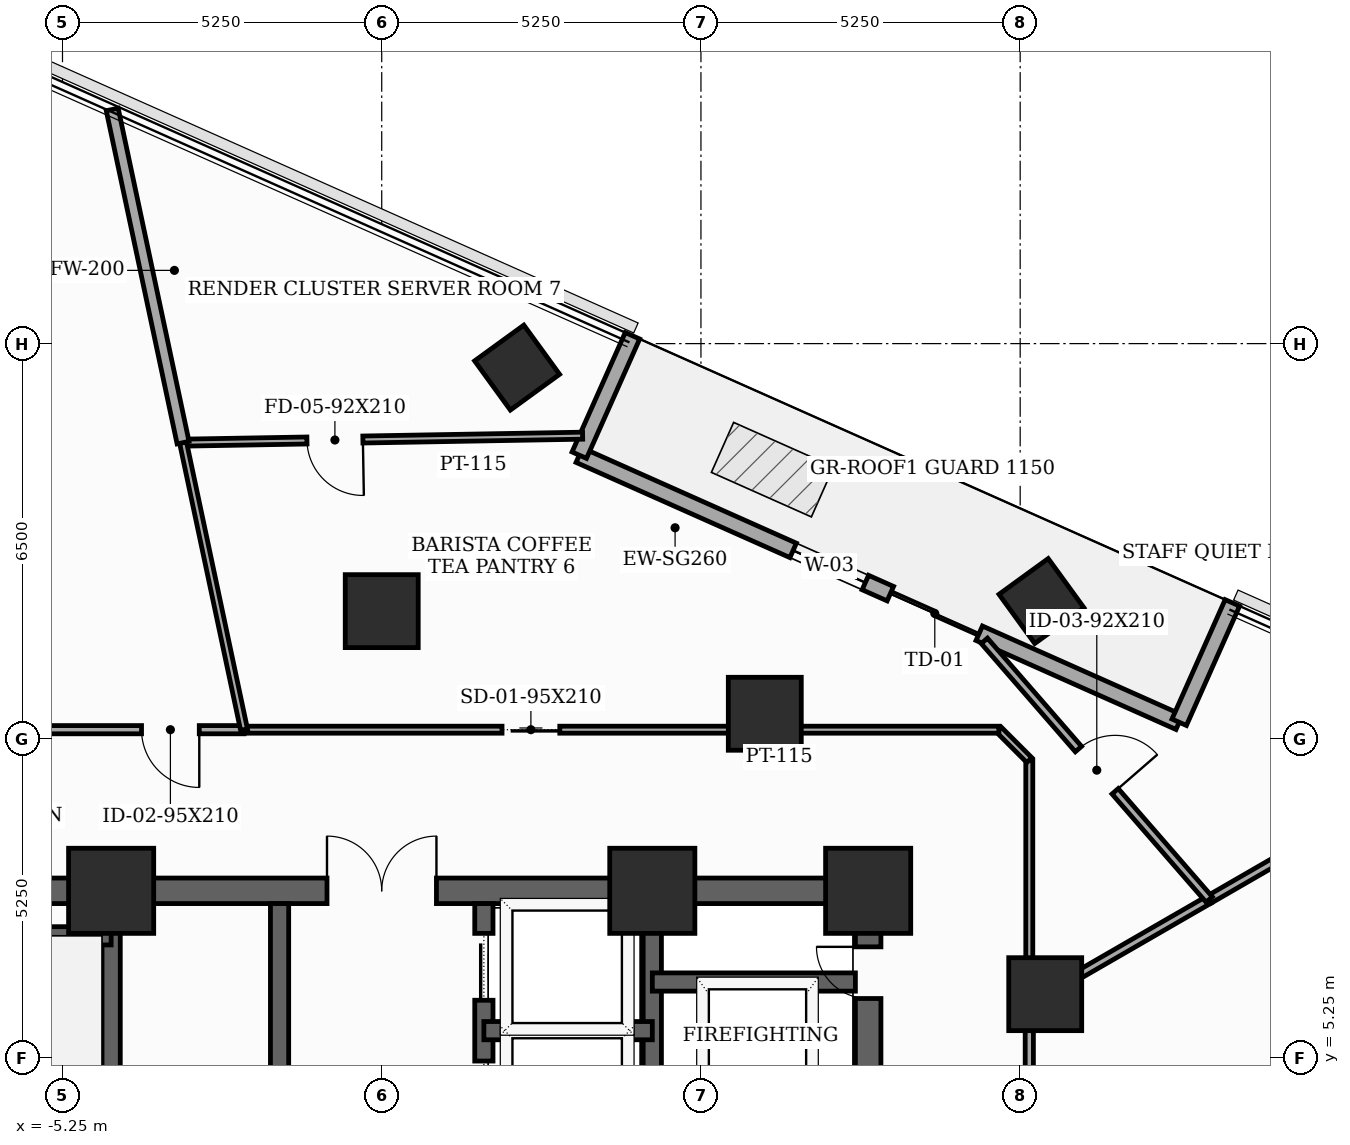
"""IFC4 building model, lengths in metres.
Left out: names, types, materials, properties, quantities, classifications, styles, units other than length and angle.
Written with IfcOpenShell. Run it as: python <this file> out.ifc"""

import sys

from ifc_helpers import new_model, si_unit, direction, frame, frame_2d, origin, origin_2d, place, context, subcontext, project, spatial, rectangle, extrude, element, fill, save


model = new_model("IFC4")
c1 = context("Model", 3, precision=1e-05, world=origin(), true_north=direction((0.0, 1.0)))
c2 = subcontext(c1, "Body", "Model", "MODEL_VIEW")
j1 = project(units=[si_unit("LENGTHUNIT", "METRE"), si_unit("PLANEANGLEUNIT", "RADIAN")], contexts=[c1])
p1 = place(None, origin())
s1 = spatial("IfcSite", under=j1, at=p1, CompositionType="ELEMENT")
p2 = place(p1, origin())
s2 = spatial("IfcBuilding", under=s1, at=p2, CompositionType="ELEMENT")
p3 = place(p2, frame((0.0, 0.0, 176.8)))
s3 = spatial("IfcBuildingStorey", under=s2, at=p3, CompositionType="ELEMENT", Elevation=176.8)
for number, where, z_axis, x_axis in (
    (1, (8.0, 8.0, 0.0), (0.0, 0.0, 1.0), (1.0, 0.0, 0.0)),
    (2, (4.45, 8.0, 0.0), (0.0, 0.0, 1.0), (1.0, 0.0, 0.0)),
    (3, (-4.45, 8.0, 0.0), (0.0, 0.0, 1.0), (1.0, 0.0, 0.0)),
):
    element("IfcColumn", number, at=place(p3, frame(where, z_axis=z_axis, x_axis=x_axis)), inside=s3, PredefinedType="COLUMN", context=c2, shape_type="SweptSolid", body=[
        extrude(rectangle(XDim=1.4, YDim=1.4, at=origin_2d()), origin(), (0.0, 0.0, 1.0), 3.7),
    ])
for number, where, z_axis, x_axis in (
    (4, (10.912, 6.3, 0.0), (0.0, 0.0, 1.0), (1.0, 0.0, 0.0)),
    (5, (6.3, 10.912, 0.0), (0.0, 0.0, 1.0), (1.0, 0.0, 0.0)),
    (6, (0.0, 12.6, 0.0), (0.0, 0.0, 1.0), (1.0, 0.0, 0.0)),
):
    element("IfcColumn", number, at=place(p3, frame(where, z_axis=z_axis, x_axis=x_axis)), inside=s3, PredefinedType="COLUMN", context=c2, shape_type="SweptSolid", body=[
        extrude(rectangle(XDim=1.2, YDim=1.2, at=origin_2d()), origin(), (0.0, 0.0, 1.0), 3.7),
    ])
for number, where, z_axis, x_axis in (
    (7, (10.85, 12.766, 0.0), (0.0, 0.0, 1.0), (0.809, 0.588, 0.0)),
    (8, (2.227, 16.605, 0.0), (0.0, 0.0, 1.0), (0.809, 0.588, 0.0)),
):
    element("IfcColumn", number, at=place(p3, frame(where, z_axis=z_axis, x_axis=x_axis)), inside=s3, PredefinedType="COLUMN", context=c2, shape_type="SweptSolid", body=[
        extrude(rectangle(XDim=1.0, YDim=1.0, at=origin_2d()), origin(), (0.0, 0.0, 1.0), 3.7),
    ])
p4 = place(p3, frame((13.115, 10.772, 0.0), z_axis=(0.0, 0.0, 1.0), x_axis=(-0.913545683247, 0.406736136359, 0.0)))
e9 = element("IfcWall", 9, at=p4, inside=s3, PredefinedType="SOLIDWALL", context=c2, shape_type="SweptSolid", body=[
    extrude(rectangle(XDim=10.8, YDim=0.26, at=frame_2d((5.4, 0.0))), origin(), (0.0, 0.0, 1.0), 3.5),
])
p5 = place(p4, frame((3.6, 0.0, 0.0)))
e10 = element("IfcOpeningElement", 10, at=p5, cuts=e9, PredefinedType="OPENING", context=c2, shape_type="SweptSolid", body=[
    extrude(rectangle(XDim=1.6, YDim=2.08, at=frame_2d((0.8, 1.04))), frame((0.0, 0.14, 0.0), z_axis=(0.0, -1.0, 0.0), x_axis=(1.0, 0.0, 0.0)), (0.0, 0.0, 1.0), 0.28),
])
p6 = place(p4, frame((5.65, 0.0, 0.85)))
e11 = element("IfcOpeningElement", 11, at=p6, cuts=e9, PredefinedType="OPENING", context=c2, shape_type="SweptSolid", body=[
    extrude(rectangle(XDim=1.3, YDim=1.25, at=frame_2d((0.65, 0.625))), frame((0.0, 0.14, 0.0), z_axis=(0.0, -1.0, 0.0), x_axis=(1.0, 0.0, 0.0)), (0.0, 0.0, 1.0), 0.28),
])
for number, where, z_axis, x_axis in (
    (12, (13.99, 12.736, 0.0), (0.0, 0.0, 1.0), (-0.407, -0.914, 0.0)),
    (13, (3.249, 15.165, 0.0), (0.0, 0.0, 1.0), (0.407, 0.914, 0.0)),
):
    element("IfcWall", number, at=place(p3, frame(where, z_axis=z_axis, x_axis=x_axis)), inside=s3, PredefinedType="SOLIDWALL", context=c2, shape_type="SweptSolid", body=[
        extrude(rectangle(XDim=2.15, YDim=0.26, at=frame_2d((1.075, 0.0))), origin(), (0.0, 0.0, 1.0), 3.5),
    ])
p7 = place(p3, frame((8.0, -8.0, 0.0), z_axis=(0.0, 0.0, 1.0), x_axis=(0.0, 1.0, 0.0)))
e14 = element("IfcWall", 14, at=p7, inside=s3, PredefinedType="SHEAR", context=c2, shape_type="SweptSolid", body=[
    extrude(rectangle(XDim=16.0, YDim=0.42, at=frame_2d((8.0, 0.0))), origin(), (0.0, 0.0, 1.0), 3.5),
])
p8 = place(p7, frame((9.6, 0.0, 0.0)))
e15 = element("IfcOpeningElement", 15, at=p8, cuts=e14, PredefinedType="OPENING", context=c2, shape_type="SweptSolid", body=[
    extrude(rectangle(XDim=1.05, YDim=2.15, at=frame_2d((0.525, 1.075))), frame((0.0, 0.22, 0.0), z_axis=(0.0, -1.0, 0.0), x_axis=(1.0, 0.0, 0.0)), (0.0, 0.0, 1.0), 0.44),
])
p9 = place(p7, frame((14.229, 0.0, 0.0)))
e16 = element("IfcOpeningElement", 16, at=p9, cuts=e14, PredefinedType="OPENING", context=c2, shape_type="SweptSolid", body=[
    extrude(rectangle(XDim=0.85, YDim=2.02, at=frame_2d((0.425, 1.01))), frame((0.0, 0.22, 0.0), z_axis=(0.0, -1.0, 0.0), x_axis=(1.0, 0.0, 0.0)), (0.0, 0.0, 1.0), 0.44),
])
p10 = place(p3, frame((-8.0, 8.0, 0.0), z_axis=(0.0, 0.0, 1.0), x_axis=(1.0, 0.0, 0.0)))
e17 = element("IfcWall", 17, at=p10, inside=s3, PredefinedType="SHEAR", context=c2, shape_type="SweptSolid", body=[
    extrude(rectangle(XDim=16.0, YDim=0.42, at=frame_2d((8.0, 0.0))), origin(), (0.0, 0.0, 1.0), 3.5),
])
p11 = place(p10, frame((7.1, 0.0, 0.0)))
e18 = element("IfcOpeningElement", 18, at=p11, cuts=e17, PredefinedType="OPENING", context=c2, shape_type="SweptSolid", body=[
    extrude(rectangle(XDim=1.8, YDim=2.15, at=frame_2d((0.9, 1.075))), frame((0.0, 0.22, 0.0), z_axis=(0.0, -1.0, 0.0), x_axis=(1.0, 0.0, 0.0)), (0.0, 0.0, 1.0), 0.44),
])
for number, where, z_axis, x_axis in (
    (19, (-4.45, -7.79, 0.0), (0.0, 0.0, 1.0), (0.0, 1.0, 0.0)),
    (20, (4.45, -7.79, 0.0), (0.0, 0.0, 1.0), (0.0, 1.0, 0.0)),
):
    element("IfcWall", number, at=place(p3, frame(where, z_axis=z_axis, x_axis=x_axis)), inside=s3, PredefinedType="SHEAR", context=c2, shape_type="SweptSolid", body=[
        extrude(rectangle(XDim=15.58, YDim=0.3, at=frame_2d((7.79, 0.0))), origin(), (0.0, 0.0, 1.0), 3.5),
    ])
for number, where, z_axis, x_axis in (
    (21, (-7.79, 7.26, 0.0), (0.0, 0.0, 1.0), (1.0, 0.0, 0.0)),
    (22, (4.45, 6.5, 0.0), (0.0, 0.0, 1.0), (1.0, 0.0, 0.0)),
):
    element("IfcWall", number, at=place(p3, frame(where, z_axis=z_axis, x_axis=x_axis)), inside=s3, PredefinedType="SHEAR", context=c2, shape_type="SweptSolid", body=[
        extrude(rectangle(XDim=3.34, YDim=0.3, at=frame_2d((1.67, 0.0))), origin(), (0.0, 0.0, 1.0), 3.5),
    ])
p12 = place(p3, frame((-1.68, -4.85, 0.0), z_axis=(0.0, 0.0, 1.0), x_axis=(0.0, 1.0, 0.0)))
e23 = element("IfcWall", 23, at=p12, inside=s3, PredefinedType="SHEAR", context=c2, shape_type="SweptSolid", body=[
    extrude(rectangle(XDim=12.64, YDim=0.3, at=frame_2d((6.32, 0.0))), origin(), (0.0, 0.0, 1.0), 3.5),
])
p13 = place(p12, frame((1.05, 0.0, 0.0)))
e24 = element("IfcOpeningElement", 24, at=p13, cuts=e23, PredefinedType="OPENING", context=c2, shape_type="SweptSolid", body=[
    extrude(rectangle(XDim=0.85, YDim=2.02, at=frame_2d((0.425, 1.01))), frame((0.0, 0.16, 0.0), z_axis=(0.0, -1.0, 0.0), x_axis=(1.0, 0.0, 0.0)), (0.0, 0.0, 1.0), 0.32),
])
p14 = place(p12, frame((6.8, 0.0, 0.0)))
e25 = element("IfcOpeningElement", 25, at=p14, cuts=e23, PredefinedType="OPENING", context=c2, shape_type="SweptSolid", body=[
    extrude(rectangle(XDim=0.95, YDim=2.1, at=frame_2d((0.475, 1.05))), frame((0.0, 0.16, 0.0), z_axis=(0.0, -1.0, 0.0), x_axis=(1.0, 0.0, 0.0)), (0.0, 0.0, 1.0), 0.32),
])
p15 = place(p3, frame((1.68, -4.85, 0.0), z_axis=(0.0, 0.0, 1.0), x_axis=(0.0, 1.0, 0.0)))
e26 = element("IfcWall", 26, at=p15, inside=s3, PredefinedType="SHEAR", context=c2, shape_type="SweptSolid", body=[
    extrude(rectangle(XDim=12.64, YDim=0.3, at=frame_2d((6.32, 0.0))), origin(), (0.0, 0.0, 1.0), 3.5),
])
p16 = place(p15, frame((0.55, 0.0, 0.0)))
e27 = element("IfcOpeningElement", 27, at=p16, cuts=e26, PredefinedType="OPENING", context=c2, shape_type="SweptSolid", body=[
    extrude(rectangle(XDim=1.1, YDim=2.1, at=frame_2d((0.55, 1.05))), frame((0.0, 0.16, 0.0), z_axis=(0.0, -1.0, 0.0), x_axis=(1.0, 0.0, 0.0)), (0.0, 0.0, 1.0), 0.32),
])
p17 = place(p15, frame((2.65, 0.0, 0.0)))
e28 = element("IfcOpeningElement", 28, at=p17, cuts=e26, PredefinedType="OPENING", context=c2, shape_type="SweptSolid", body=[
    extrude(rectangle(XDim=1.1, YDim=2.1, at=frame_2d((0.55, 1.05))), frame((0.0, 0.16, 0.0), z_axis=(0.0, -1.0, 0.0), x_axis=(1.0, 0.0, 0.0)), (0.0, 0.0, 1.0), 0.32),
])
p18 = place(p15, frame((4.75, 0.0, 0.0)))
e29 = element("IfcOpeningElement", 29, at=p18, cuts=e26, PredefinedType="OPENING", context=c2, shape_type="SweptSolid", body=[
    extrude(rectangle(XDim=1.1, YDim=2.1, at=frame_2d((0.55, 1.05))), frame((0.0, 0.16, 0.0), z_axis=(0.0, -1.0, 0.0), x_axis=(1.0, 0.0, 0.0)), (0.0, 0.0, 1.0), 0.32),
])
p19 = place(p15, frame((6.85, 0.0, 0.0)))
e30 = element("IfcOpeningElement", 30, at=p19, cuts=e26, PredefinedType="OPENING", context=c2, shape_type="SweptSolid", body=[
    extrude(rectangle(XDim=1.1, YDim=2.1, at=frame_2d((0.55, 1.05))), frame((0.0, 0.16, 0.0), z_axis=(0.0, -1.0, 0.0), x_axis=(1.0, 0.0, 0.0)), (0.0, 0.0, 1.0), 0.32),
])
p20 = place(p15, frame((8.95, 0.0, 0.0)))
e31 = element("IfcOpeningElement", 31, at=p20, cuts=e26, PredefinedType="OPENING", context=c2, shape_type="SweptSolid", body=[
    extrude(rectangle(XDim=1.1, YDim=2.1, at=frame_2d((0.55, 1.05))), frame((0.0, 0.16, 0.0), z_axis=(0.0, -1.0, 0.0), x_axis=(1.0, 0.0, 0.0)), (0.0, 0.0, 1.0), 0.32),
])
p21 = place(p15, frame((11.05, 0.0, 0.0)))
e32 = element("IfcOpeningElement", 32, at=p21, cuts=e26, PredefinedType="OPENING", context=c2, shape_type="SweptSolid", body=[
    extrude(rectangle(XDim=1.1, YDim=2.1, at=frame_2d((0.55, 1.05))), frame((0.0, 0.16, 0.0), z_axis=(0.0, -1.0, 0.0), x_axis=(1.0, 0.0, 0.0)), (0.0, 0.0, 1.0), 0.32),
])
p22 = place(p3, frame((1.68, 5.7, 0.0), z_axis=(0.0, 0.0, 1.0), x_axis=(1.0, 0.0, 0.0)))
e33 = element("IfcWall", 33, at=p22, inside=s3, PredefinedType="SHEAR", context=c2, shape_type="SweptSolid", body=[
    extrude(rectangle(XDim=2.77, YDim=0.3, at=frame_2d((1.385, 0.0))), origin(), (0.0, 0.0, 1.0), 3.5),
])
p23 = place(p3, frame((10.65, -6.149, 0.0), z_axis=(0.0, 0.0, 1.0), x_axis=(0.0, 1.0, 0.0)))
e34 = element("IfcWall", 34, at=p23, inside=s3, PredefinedType="PARTITIONING", context=c2, shape_type="SweptSolid", body=[
    extrude(rectangle(XDim=12.298, YDim=0.135, at=frame_2d((6.149, 0.0))), origin(), (0.0, 0.0, 1.0), 2.885),
])
p24 = place(p23, frame((4.198, 0.0, 0.0)))
e35 = element("IfcOpeningElement", 35, at=p24, cuts=e34, PredefinedType="OPENING", context=c2, shape_type="SweptSolid", body=[
    extrude(rectangle(XDim=0.95, YDim=2.1, at=frame_2d((0.475, 1.05))), frame((0.0, 0.077, 0.0), z_axis=(0.0, -1.0, 0.0), x_axis=(1.0, 0.0, 0.0)), (0.0, 0.0, 1.0), 0.155),
])
p25 = place(p3, frame((10.65, 6.149, 0.0), z_axis=(0.0, 0.0, 1.0), x_axis=(0.0, 1.0, 0.0)))
e36 = element("IfcWall", 36, at=p25, inside=s3, PredefinedType="PARTITIONING", context=c2, shape_type="SweptSolid", body=[
    extrude(rectangle(XDim=4.001, YDim=0.115, at=frame_2d((2.0, 0.0))), origin(), (0.0, 0.0, 1.0), 2.885),
])
p26 = place(p3, frame((10.65, 10.15, 0.0), z_axis=(0.0, 0.0, 1.0), x_axis=(-0.707106781187, 0.707106781187, 0.0)))
e37 = element("IfcWall", 37, at=p26, inside=s3, PredefinedType="PARTITIONING", context=c2, shape_type="SweptSolid", body=[
    extrude(rectangle(XDim=0.707, YDim=0.115, at=frame_2d((0.354, 0.0))), origin(), (0.0, 0.0, 1.0), 3.5),
])
p27 = place(p3, frame((10.15, 10.65, 0.0), z_axis=(0.0, 0.0, 1.0), x_axis=(-1.0, 0.0, 0.0)))
e38 = element("IfcWall", 38, at=p27, inside=s3, PredefinedType="PARTITIONING", context=c2, shape_type="SweptSolid", body=[
    extrude(rectangle(XDim=12.414, YDim=0.115, at=frame_2d((6.207, 0.0))), origin(), (0.0, 0.0, 1.0), 2.885),
])
p28 = place(p27, frame((7.222, 0.0, 0.0)))
e39 = element("IfcOpeningElement", 39, at=p28, cuts=e38, PredefinedType="OPENING", context=c2, shape_type="SweptSolid", body=[
    extrude(rectangle(XDim=0.95, YDim=2.1, at=frame_2d((0.475, 1.05))), frame((0.0, 0.067, 0.0), z_axis=(0.0, -1.0, 0.0), x_axis=(1.0, 0.0, 0.0)), (0.0, 0.0, 1.0), 0.135),
])
p29 = place(p3, frame((-2.264, 10.65, 0.0), z_axis=(0.0, 0.0, 1.0), x_axis=(-1.0, 0.0, 0.0)))
e40 = element("IfcWall", 40, at=p29, inside=s3, PredefinedType="PARTITIONING", context=c2, shape_type="SweptSolid", body=[
    extrude(rectangle(XDim=6.057, YDim=0.135, at=frame_2d((3.029, 0.0))), origin(), (0.0, 0.0, 1.0), 2.885),
])
p30 = place(p29, frame((0.736, 0.0, 0.0)))
e41 = element("IfcOpeningElement", 41, at=p30, cuts=e40, PredefinedType="OPENING", context=c2, shape_type="SweptSolid", body=[
    extrude(rectangle(XDim=0.95, YDim=2.1, at=frame_2d((0.475, 1.05))), frame((0.0, 0.077, 0.0), z_axis=(0.0, -1.0, 0.0), x_axis=(1.0, 0.0, 0.0)), (0.0, 0.0, 1.0), 0.155),
])
p31 = place(p3, frame((18.46, 10.658, 0.0), z_axis=(0.0, 0.0, 1.0), x_axis=(-0.865978736514, -0.500080821373, 0.0)))
e42 = element("IfcWall", 42, at=p31, inside=s3, PredefinedType="PARTITIONING", context=c2, shape_type="SweptSolid", body=[
    extrude(rectangle(XDim=5.602, YDim=0.135, at=frame_2d((2.801, 0.0))), origin(), (0.0, 0.0, 1.0), 2.985),
])
p32 = place(p3, frame((13.609, 7.857, 0.0), z_axis=(0.0, 0.0, 1.0), x_axis=(-0.866071357471, -0.499920397431, 0.0)))
e43 = element("IfcWall", 43, at=p32, inside=s3, PredefinedType="PARTITIONING", context=c2, shape_type="SweptSolid", body=[
    extrude(rectangle(XDim=3.417, YDim=0.135, at=frame_2d((1.708, 0.0))), origin(), (0.0, 0.0, 1.0), 2.885),
])
p33 = place(p3, frame((9.911, 12.111, 0.0), z_axis=(0.0, 0.0, 1.0), x_axis=(0.656029654943, -0.754735113689, 0.0)))
e44 = element("IfcWall", 44, at=p33, inside=s3, PredefinedType="PARTITIONING", context=c2, shape_type="SweptSolid", body=[
    extrude(rectangle(XDim=5.637, YDim=0.135, at=frame_2d((2.818, 0.0))), origin(), (0.0, 0.0, 1.0), 3.5),
])
p34 = place(p33, frame((2.358, 0.0, 0.0)))
e45 = element("IfcOpeningElement", 45, at=p34, cuts=e44, PredefinedType="OPENING", context=c2, shape_type="SweptSolid", body=[
    extrude(rectangle(XDim=0.92, YDim=2.1, at=frame_2d((0.46, 1.05))), frame((0.0, 0.077, 0.0), z_axis=(0.0, -1.0, 0.0), x_axis=(1.0, 0.0, 0.0)), (0.0, 0.0, 1.0), 0.155),
])
p35 = place(p3, frame((3.304, 15.486, 0.0), z_axis=(0.0, 0.0, 1.0), x_axis=(-0.999848226563, -0.017421935587, 0.0)))
e46 = element("IfcWall", 46, at=p35, inside=s3, PredefinedType="PARTITIONING", context=c2, shape_type="SweptSolid", body=[
    extrude(rectangle(XDim=6.572, YDim=0.115, at=frame_2d((3.286, 0.0))), origin(), (0.0, 0.0, 1.0), 2.885),
])
p36 = place(p35, frame((3.615, 0.0, 0.0)))
e47 = element("IfcOpeningElement", 47, at=p36, cuts=e46, PredefinedType="OPENING", context=c2, shape_type="SweptSolid", body=[
    extrude(rectangle(XDim=0.92, YDim=2.1, at=frame_2d((0.46, 1.05))), frame((0.0, 0.067, 0.0), z_axis=(0.0, -1.0, 0.0), x_axis=(1.0, 0.0, 0.0)), (0.0, 0.0, 1.0), 0.135),
])
p37 = place(p3, frame((-3.267, 15.371, 0.0), z_axis=(0.0, 0.0, 1.0), x_axis=(0.207843026781, -0.978162193207, 0.0)))
e48 = element("IfcWall", 48, at=p37, inside=s3, PredefinedType="PARTITIONING", context=c2, shape_type="SweptSolid", body=[
    extrude(rectangle(XDim=4.827, YDim=0.115, at=frame_2d((2.413, 0.0))), origin(), (0.0, 0.0, 1.0), 2.885),
])
p38 = place(p3, frame((-4.432, 20.851, 0.0), z_axis=(0.0, 0.0, 1.0), x_axis=(0.208002083798, -0.978128382747, 0.0)))
e49 = element("IfcWall", 49, at=p38, inside=s3, PredefinedType="SOLIDWALL", context=c2, shape_type="SweptSolid", body=[
    extrude(rectangle(XDim=5.602, YDim=0.2, at=frame_2d((2.801, 0.0))), origin(), (0.0, 0.0, 1.0), 2.985),
])
p39 = place(p5, frame((1.6, 0.0, 0.0), z_axis=(0.0, 0.0, 1.0), x_axis=(-1.0, 0.0, 0.0)))
e50 = element("IfcDoor", 50, at=p39, inside=s3, OperationType="DOUBLE_DOOR_SLIDING", PredefinedType="DOOR", context=c2, shape_type="SweptSolid", body=[
    extrude(rectangle(XDim=1.6, YDim=2.08, at=frame_2d((0.8, 1.04))), frame((0.0, 0.025, 0.0), z_axis=(0.0, -1.0, 0.0), x_axis=(1.0, 0.0, 0.0)), (0.0, 0.0, 1.0), 0.05),
])
fill(e10, e50)
p40 = place(p6, origin())
e51 = element("IfcWindow", 51, at=p40, inside=s3, PartitioningType="SINGLE_PANEL", PredefinedType="WINDOW", context=c2, shape_type="SweptSolid", body=[
    extrude(rectangle(XDim=1.3, YDim=1.25, at=frame_2d((0.65, 0.625))), frame((0.0, 0.03, 0.0), z_axis=(0.0, -1.0, 0.0), x_axis=(1.0, 0.0, 0.0)), (0.0, 0.0, 1.0), 0.06),
])
fill(e11, e51)
p41 = place(p9, origin())
e52 = element("IfcDoor", 52, at=p41, inside=s3, OperationType="SINGLE_SWING_RIGHT", PredefinedType="TRAPDOOR", context=c2, shape_type="SweptSolid", body=[
    extrude(rectangle(XDim=0.85, YDim=2.02, at=frame_2d((0.425, 1.01))), frame((0.0, 0.025, 0.0), z_axis=(0.0, -1.0, 0.0), x_axis=(1.0, 0.0, 0.0)), (0.0, 0.0, 1.0), 0.05),
])
fill(e16, e52)
p42 = place(p11, origin())
e53 = element("IfcDoor", 53, at=p42, inside=s3, OperationType="DOUBLE_DOOR_SINGLE_SWING", PredefinedType="DOOR", context=c2, shape_type="SweptSolid", body=[
    extrude(rectangle(XDim=1.8, YDim=2.15, at=frame_2d((0.9, 1.075))), frame((0.0, 0.025, 0.0), z_axis=(0.0, -1.0, 0.0), x_axis=(1.0, 0.0, 0.0)), (0.0, 0.0, 1.0), 0.05),
])
fill(e18, e53)
p43 = place(p20, origin())
e54 = element("IfcDoor", 54, at=p43, inside=s3, OperationType="SLIDING_TO_LEFT", PredefinedType="DOOR", context=c2, shape_type="SweptSolid", body=[
    extrude(rectangle(XDim=1.1, YDim=2.1, at=frame_2d((0.55, 1.05))), frame((0.0, 0.025, 0.0), z_axis=(0.0, -1.0, 0.0), x_axis=(1.0, 0.0, 0.0)), (0.0, 0.0, 1.0), 0.05),
])
fill(e31, e54)
p44 = place(p21, origin())
e55 = element("IfcDoor", 55, at=p44, inside=s3, OperationType="SLIDING_TO_LEFT", PredefinedType="DOOR", context=c2, shape_type="SweptSolid", body=[
    extrude(rectangle(XDim=1.1, YDim=2.1, at=frame_2d((0.55, 1.05))), frame((0.0, 0.025, 0.0), z_axis=(0.0, -1.0, 0.0), x_axis=(1.0, 0.0, 0.0)), (0.0, 0.0, 1.0), 0.05),
])
fill(e32, e55)
p45 = place(p28, origin())
e56 = element("IfcDoor", 56, at=p45, inside=s3, OperationType="SLIDING_TO_LEFT", PredefinedType="DOOR", context=c2, shape_type="SweptSolid", body=[
    extrude(rectangle(XDim=0.95, YDim=2.1, at=frame_2d((0.475, 1.05))), frame((0.0, 0.025, 0.0), z_axis=(0.0, -1.0, 0.0), x_axis=(1.0, 0.0, 0.0)), (0.0, 0.0, 1.0), 0.05),
])
fill(e39, e56)
p46 = place(p30, origin())
e57 = element("IfcDoor", 57, at=p46, inside=s3, OperationType="SINGLE_SWING_LEFT", PredefinedType="DOOR", context=c2, shape_type="SweptSolid", body=[
    extrude(rectangle(XDim=0.95, YDim=2.1, at=frame_2d((0.475, 1.05))), frame((0.0, 0.025, 0.0), z_axis=(0.0, -1.0, 0.0), x_axis=(1.0, 0.0, 0.0)), (0.0, 0.0, 1.0), 0.05),
])
fill(e41, e57)
p47 = place(p34, origin())
e58 = element("IfcDoor", 58, at=p47, inside=s3, OperationType="SINGLE_SWING_RIGHT", PredefinedType="DOOR", context=c2, shape_type="SweptSolid", body=[
    extrude(rectangle(XDim=0.92, YDim=2.1, at=frame_2d((0.46, 1.05))), frame((0.0, 0.025, 0.0), z_axis=(0.0, -1.0, 0.0), x_axis=(1.0, 0.0, 0.0)), (0.0, 0.0, 1.0), 0.05),
])
fill(e45, e58)
p48 = place(p36, origin())
e59 = element("IfcDoor", 59, at=p48, inside=s3, OperationType="SINGLE_SWING_LEFT", PredefinedType="DOOR", context=c2, shape_type="SweptSolid", body=[
    extrude(rectangle(XDim=0.92, YDim=2.1, at=frame_2d((0.46, 1.05))), frame((0.0, 0.025, 0.0), z_axis=(0.0, -1.0, 0.0), x_axis=(1.0, 0.0, 0.0)), (0.0, 0.0, 1.0), 0.05),
])
fill(e47, e59)
save(model, sys.argv[1])
